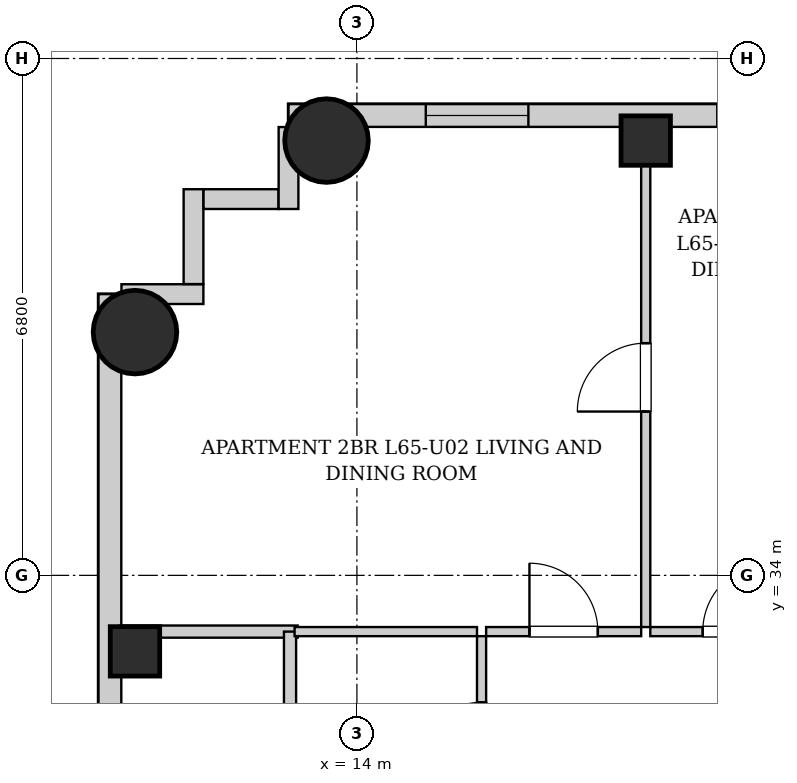
"""IFC4 building model, lengths in metres.
Left out: names, types, materials, properties, quantities, classifications, styles, units other than length and angle.
Written with IfcOpenShell. Run it as: python <this file> out.ifc"""

import sys

from ifc_helpers import new_model, si_unit, direction, frame, frame_2d, origin, origin_2d, place, context, subcontext, project, spatial, rectangle, circle, extrude, element, fill, save


model = new_model("IFC4")
c1 = context("Model", 3, precision=1e-05, world=origin(), true_north=direction((0.0, 1.0)))
c2 = subcontext(c1, "Body", "Model", "MODEL_VIEW")
j1 = project(units=[si_unit("LENGTHUNIT", "METRE"), si_unit("PLANEANGLEUNIT", "RADIAN")], contexts=[c1])
p1 = place(None, origin())
s1 = spatial("IfcSite", under=j1, at=p1, CompositionType="ELEMENT")
p2 = place(p1, origin())
s2 = spatial("IfcBuilding", under=s1, at=p2, CompositionType="ELEMENT")
p3 = place(p2, frame((0.0, 0.0, 224.1)))
s3 = spatial("IfcBuildingStorey", under=s2, at=p3, CompositionType="ELEMENT", Elevation=224.1)
p4 = place(p3, frame((13.6, 39.72, 0.0), z_axis=(0.0, 0.0, 1.0), x_axis=(1.0, 0.0, 0.0)))
e1 = element("IfcColumn", 1, at=p4, inside=s3, PredefinedType="COLUMN", context=c2, shape_type="SweptSolid", body=[
    extrude(circle(Radius=0.55, at=origin_2d()), origin(), (0.0, 0.0, 1.0), 3.4),
])
for number, where, z_axis, x_axis in (
    (2, (17.8, 39.72, 0.0), (0.0, 0.0, 1.0), (1.0, 0.0, 0.0)),
    (3, (11.08, 33.0, 0.0), (0.0, 0.0, 1.0), (1.0, 0.0, 0.0)),
):
    element("IfcColumn", number, at=place(p3, frame(where, z_axis=z_axis, x_axis=x_axis)), inside=s3, PredefinedType="COLUMN", context=c2, shape_type="SweptSolid", body=[
        extrude(rectangle(XDim=0.65, YDim=0.65, at=origin_2d()), origin(), (0.0, 0.0, 1.0), 3.4),
    ])
p5 = place(p3, frame((11.08, 37.2, 0.0), z_axis=(0.0, 0.0, 1.0), x_axis=(1.0, 0.0, 0.0)))
e4 = element("IfcColumn", 4, at=p5, inside=s3, PredefinedType="COLUMN", context=c2, shape_type="SweptSolid", body=[
    extrude(circle(Radius=0.55, at=origin_2d()), origin(), (0.0, 0.0, 1.0), 3.4),
])
p6 = place(p3, frame((13.1, 40.05, 0.0), z_axis=(0.0, 0.0, 1.0), x_axis=(1.0, 0.0, 0.0)))
e5 = element("IfcWall", 5, at=p6, inside=s3, PredefinedType="SOLIDWALL", context=c2, shape_type="SweptSolid", body=[
    extrude(rectangle(XDim=18.8, YDim=0.3, at=frame_2d((9.4, 0.0))), origin(), (0.0, 0.0, 1.0), 3.14),
])
p7 = place(p6, frame((1.806, 0.0, 0.55)))
e6 = element("IfcOpeningElement", 6, at=p7, cuts=e5, PredefinedType="OPENING", context=c2, shape_type="SweptSolid", body=[
    extrude(rectangle(XDim=1.35, YDim=1.2, at=frame_2d((0.675, 0.6))), frame((0.0, 0.16, 0.0), z_axis=(0.0, -1.0, 0.0), x_axis=(1.0, 0.0, 0.0)), (0.0, 0.0, 1.0), 0.32),
])
p8 = place(p6, frame((5.641, 0.0, 0.55)))
e7 = element("IfcOpeningElement", 7, at=p8, cuts=e5, PredefinedType="OPENING", context=c2, shape_type="SweptSolid", body=[
    extrude(rectangle(XDim=1.35, YDim=1.2, at=frame_2d((0.675, 0.6))), frame((0.0, 0.16, 0.0), z_axis=(0.0, -1.0, 0.0), x_axis=(1.0, 0.0, 0.0)), (0.0, 0.0, 1.0), 0.32),
])
p9 = place(p6, frame((8.55, 0.0, 0.55)))
e8 = element("IfcOpeningElement", 8, at=p9, cuts=e5, PredefinedType="OPENING", context=c2, shape_type="SweptSolid", body=[
    extrude(rectangle(XDim=0.85, YDim=1.2, at=frame_2d((0.425, 0.6))), frame((0.0, 0.16, 0.0), z_axis=(0.0, -1.0, 0.0), x_axis=(1.0, 0.0, 0.0)), (0.0, 0.0, 1.0), 0.32),
])
p10 = place(p6, frame((14.4, 0.0, 0.55)))
e9 = element("IfcOpeningElement", 9, at=p10, cuts=e5, PredefinedType="OPENING", context=c2, shape_type="SweptSolid", body=[
    extrude(rectangle(XDim=1.35, YDim=1.2, at=frame_2d((0.675, 0.6))), frame((0.0, 0.16, 0.0), z_axis=(0.0, -1.0, 0.0), x_axis=(1.0, 0.0, 0.0)), (0.0, 0.0, 1.0), 0.32),
])
p11 = place(p3, frame((10.75, 6.3, 0.0), z_axis=(0.0, 0.0, 1.0), x_axis=(0.0, 1.0, 0.0)))
e10 = element("IfcWall", 10, at=p11, inside=s3, PredefinedType="SOLIDWALL", context=c2, shape_type="SweptSolid", body=[
    extrude(rectangle(XDim=31.4, YDim=0.3, at=frame_2d((15.7, 0.0))), origin(), (0.0, 0.0, 1.0), 3.14),
])
p12 = place(p11, frame((1.653, 0.0, 0.55)))
e11 = element("IfcOpeningElement", 11, at=p12, cuts=e10, PredefinedType="OPENING", context=c2, shape_type="SweptSolid", body=[
    extrude(rectangle(XDim=1.35, YDim=1.2, at=frame_2d((0.675, 0.6))), frame((0.0, 0.16, 0.0), z_axis=(0.0, -1.0, 0.0), x_axis=(1.0, 0.0, 0.0)), (0.0, 0.0, 1.0), 0.32),
])
p13 = place(p11, frame((10.367, 0.0, 0.55)))
e12 = element("IfcOpeningElement", 12, at=p13, cuts=e10, PredefinedType="OPENING", context=c2, shape_type="SweptSolid", body=[
    extrude(rectangle(XDim=1.35, YDim=1.2, at=frame_2d((0.675, 0.6))), frame((0.0, 0.16, 0.0), z_axis=(0.0, -1.0, 0.0), x_axis=(1.0, 0.0, 0.0)), (0.0, 0.0, 1.0), 0.32),
])
p14 = place(p11, frame((19.683, 0.0, 0.55)))
e13 = element("IfcOpeningElement", 13, at=p14, cuts=e10, PredefinedType="OPENING", context=c2, shape_type="SweptSolid", body=[
    extrude(rectangle(XDim=1.35, YDim=1.2, at=frame_2d((0.675, 0.6))), frame((0.0, 0.16, 0.0), z_axis=(0.0, -1.0, 0.0), x_axis=(1.0, 0.0, 0.0)), (0.0, 0.0, 1.0), 0.32),
])
p15 = place(p3, frame((10.902, 37.7, 0.0), z_axis=(0.0, 0.0, 1.0), x_axis=(1.0, 0.0, 0.0)))
e14 = element("IfcWall", 14, at=p15, inside=s3, PredefinedType="SOLIDWALL", context=c2, shape_type="SweptSolid", body=[
    extrude(rectangle(XDim=1.078, YDim=0.26, at=frame_2d((0.539, 0.0))), origin(), (0.0, 0.0, 1.0), 3.14),
])
p16 = place(p3, frame((11.85, 37.832, 0.0), z_axis=(0.0, 0.0, 1.0), x_axis=(0.0, 1.0, 0.0)))
e15 = element("IfcWall", 15, at=p16, inside=s3, PredefinedType="SOLIDWALL", context=c2, shape_type="SweptSolid", body=[
    extrude(rectangle(XDim=1.248, YDim=0.26, at=frame_2d((0.624, 0.0))), origin(), (0.0, 0.0, 1.0), 3.14),
])
p17 = place(p3, frame((11.982, 38.95, 0.0), z_axis=(0.0, 0.0, 1.0), x_axis=(1.0, 0.0, 0.0)))
e16 = element("IfcWall", 16, at=p17, inside=s3, PredefinedType="SOLIDWALL", context=c2, shape_type="SweptSolid", body=[
    extrude(rectangle(XDim=0.986, YDim=0.26, at=frame_2d((0.493, 0.0))), origin(), (0.0, 0.0, 1.0), 3.14),
])
p18 = place(p3, frame((13.1, 38.82, 0.0), z_axis=(0.0, 0.0, 1.0), x_axis=(0.0, 1.0, 0.0)))
e17 = element("IfcWall", 17, at=p18, inside=s3, PredefinedType="SOLIDWALL", context=c2, shape_type="SweptSolid", body=[
    extrude(rectangle(XDim=1.078, YDim=0.26, at=frame_2d((0.539, 0.0))), origin(), (0.0, 0.0, 1.0), 3.14),
])
p19 = place(p3, frame((10.88, 33.26, 0.0), z_axis=(0.0, 0.0, 1.0), x_axis=(1.0, 0.0, 0.0)))
e18 = element("IfcWall", 18, at=p19, inside=s3, PredefinedType="PARTITIONING", context=c2, shape_type="SweptSolid", body=[
    extrude(rectangle(XDim=2.34, YDim=0.16, at=frame_2d((1.17, 0.0))), origin(), (0.0, 0.0, 1.0), 3.14),
])
p20 = place(p3, frame((13.12, 30.6, 0.0), z_axis=(0.0, 0.0, 1.0), x_axis=(0.0, 1.0, 0.0)))
e19 = element("IfcWall", 19, at=p20, inside=s3, PredefinedType="PARTITIONING", context=c2, shape_type="SweptSolid", body=[
    extrude(rectangle(XDim=2.66, YDim=0.16, at=frame_2d((1.33, 0.0))), origin(), (0.0, 0.0, 1.0), 3.14),
])
p21 = place(p3, frame((15.64, 30.6, 0.0), z_axis=(0.0, 0.0, 1.0), x_axis=(0.0, 1.0, 0.0)))
e20 = element("IfcWall", 20, at=p21, inside=s3, PredefinedType="PARTITIONING", context=c2, shape_type="SweptSolid", body=[
    extrude(rectangle(XDim=2.6, YDim=0.12, at=frame_2d((1.3, 0.0))), origin(), (0.0, 0.0, 1.0), 3.14),
])
p22 = place(p21, frame((0.87, 0.0, 0.0)))
e21 = element("IfcOpeningElement", 21, at=p22, cuts=e20, PredefinedType="OPENING", context=c2, shape_type="SweptSolid", body=[
    extrude(rectangle(XDim=0.86, YDim=2.05, at=frame_2d((0.43, 1.025))), frame((0.0, 0.07, 0.0), z_axis=(0.0, -1.0, 0.0), x_axis=(1.0, 0.0, 0.0)), (0.0, 0.0, 1.0), 0.14),
])
p23 = place(p3, frame((13.18, 33.26, 0.0), z_axis=(0.0, 0.0, 1.0), x_axis=(1.0, 0.0, 0.0)))
e22 = element("IfcWall", 22, at=p23, inside=s3, PredefinedType="PARTITIONING", context=c2, shape_type="SweptSolid", body=[
    extrude(rectangle(XDim=2.4, YDim=0.12, at=frame_2d((1.2, 0.0))), origin(), (0.0, 0.0, 1.0), 3.14),
])
p24 = place(p3, frame((15.7, 33.26, 0.0), z_axis=(0.0, 0.0, 1.0), x_axis=(1.0, 0.0, 0.0)))
e23 = element("IfcWall", 23, at=p24, inside=s3, PredefinedType="PARTITIONING", context=c2, shape_type="SweptSolid", body=[
    extrude(rectangle(XDim=2.04, YDim=0.12, at=frame_2d((1.02, 0.0))), origin(), (0.0, 0.0, 1.0), 3.14),
])
p25 = place(p24, frame((0.57, 0.0, 0.0)))
e24 = element("IfcOpeningElement", 24, at=p25, cuts=e23, PredefinedType="OPENING", context=c2, shape_type="SweptSolid", body=[
    extrude(rectangle(XDim=0.9, YDim=2.05, at=frame_2d((0.45, 1.025))), frame((0.0, 0.07, 0.0), z_axis=(0.0, -1.0, 0.0), x_axis=(1.0, 0.0, 0.0)), (0.0, 0.0, 1.0), 0.14),
])
p26 = place(p3, frame((17.86, 33.26, 0.0), z_axis=(0.0, 0.0, 1.0), x_axis=(1.0, 0.0, 0.0)))
e25 = element("IfcWall", 25, at=p26, inside=s3, PredefinedType="PARTITIONING", context=c2, shape_type="SweptSolid", body=[
    extrude(rectangle(XDim=2.28, YDim=0.12, at=frame_2d((1.14, 0.0))), origin(), (0.0, 0.0, 1.0), 3.14),
])
p27 = place(p26, frame((0.69, 0.0, 0.0)))
e26 = element("IfcOpeningElement", 26, at=p27, cuts=e25, PredefinedType="OPENING", context=c2, shape_type="SweptSolid", body=[
    extrude(rectangle(XDim=0.9, YDim=2.05, at=frame_2d((0.45, 1.025))), frame((0.0, 0.07, 0.0), z_axis=(0.0, -1.0, 0.0), x_axis=(1.0, 0.0, 0.0)), (0.0, 0.0, 1.0), 0.14),
])
p28 = place(p3, frame((17.8, 33.32, 0.0), z_axis=(0.0, 0.0, 1.0), x_axis=(0.0, 1.0, 0.0)))
e27 = element("IfcWall", 27, at=p28, inside=s3, PredefinedType="PARTITIONING", context=c2, shape_type="SweptSolid", body=[
    extrude(rectangle(XDim=6.6, YDim=0.12, at=frame_2d((3.3, 0.0))), origin(), (0.0, 0.0, 1.0), 2.668),
])
p29 = place(p28, frame((2.835, 0.0, 0.0)))
e28 = element("IfcOpeningElement", 28, at=p29, cuts=e27, PredefinedType="OPENING", context=c2, shape_type="SweptSolid", body=[
    extrude(rectangle(XDim=0.9, YDim=2.05, at=frame_2d((0.45, 1.025))), frame((0.0, 0.07, 0.0), z_axis=(0.0, -1.0, 0.0), x_axis=(1.0, 0.0, 0.0)), (0.0, 0.0, 1.0), 0.14),
])
p30 = place(p22, origin())
e29 = element("IfcDoor", 29, at=p30, inside=s3, OperationType="SINGLE_SWING_LEFT", PredefinedType="DOOR", context=c2, shape_type="SweptSolid", body=[
    extrude(rectangle(XDim=0.86, YDim=2.05, at=frame_2d((0.43, 1.025))), frame((0.0, 0.025, 0.0), z_axis=(0.0, -1.0, 0.0), x_axis=(1.0, 0.0, 0.0)), (0.0, 0.0, 1.0), 0.05),
])
fill(e21, e29)
p31 = place(p25, origin())
e30 = element("IfcDoor", 30, at=p31, inside=s3, OperationType="SINGLE_SWING_LEFT", PredefinedType="DOOR", context=c2, shape_type="SweptSolid", body=[
    extrude(rectangle(XDim=0.9, YDim=2.05, at=frame_2d((0.45, 1.025))), frame((0.0, 0.025, 0.0), z_axis=(0.0, -1.0, 0.0), x_axis=(1.0, 0.0, 0.0)), (0.0, 0.0, 1.0), 0.05),
])
fill(e24, e30)
p32 = place(p27, origin())
e31 = element("IfcDoor", 31, at=p32, inside=s3, OperationType="SINGLE_SWING_RIGHT", PredefinedType="DOOR", context=c2, shape_type="SweptSolid", body=[
    extrude(rectangle(XDim=0.9, YDim=2.05, at=frame_2d((0.45, 1.025))), frame((0.0, 0.025, 0.0), z_axis=(0.0, -1.0, 0.0), x_axis=(1.0, 0.0, 0.0)), (0.0, 0.0, 1.0), 0.05),
])
fill(e26, e31)
p33 = place(p29, origin())
e32 = element("IfcDoor", 32, at=p33, inside=s3, OperationType="SINGLE_SWING_LEFT", PredefinedType="DOOR", context=c2, shape_type="SweptSolid", body=[
    extrude(rectangle(XDim=0.9, YDim=2.05, at=frame_2d((0.45, 1.025))), frame((0.0, 0.025, 0.0), z_axis=(0.0, -1.0, 0.0), x_axis=(1.0, 0.0, 0.0)), (0.0, 0.0, 1.0), 0.05),
])
fill(e28, e32)
p34 = place(p7, origin())
e33 = element("IfcWindow", 33, at=p34, inside=s3, PartitioningType="SINGLE_PANEL", PredefinedType="WINDOW", context=c2, shape_type="SweptSolid", body=[
    extrude(rectangle(XDim=1.35, YDim=1.2, at=frame_2d((0.675, 0.6))), frame((0.0, 0.03, 0.0), z_axis=(0.0, -1.0, 0.0), x_axis=(1.0, 0.0, 0.0)), (0.0, 0.0, 1.0), 0.06),
])
fill(e6, e33)
save(model, sys.argv[1])
